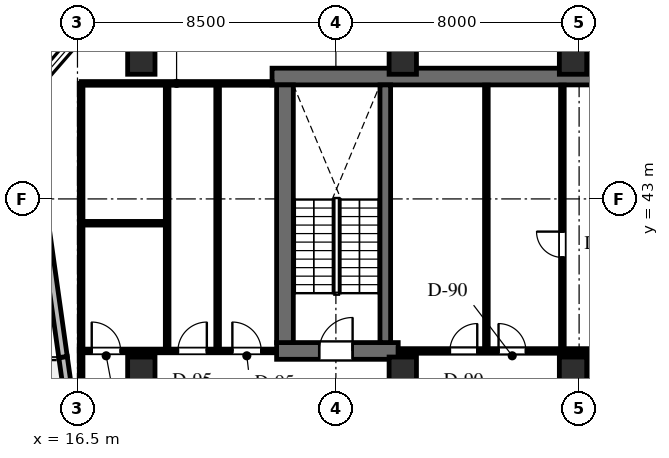
"""IFC4 building model, lengths in metres.
Left out: names, types, materials, properties, quantities, classifications, styles, units other than length and angle.
Written with IfcOpenShell. Run it as: python <this file> out.ifc"""

import sys

from ifc_helpers import new_model, si_unit, direction, frame, frame_2d, origin, origin_2d, place, context, subcontext, project, spatial, rectangle, extrude, element, fill, save


model = new_model("IFC4")
c1 = context("Model", 3, precision=1e-05, world=origin(), true_north=direction((0.0, 1.0)))
c2 = subcontext(c1, "Body", "Model", "MODEL_VIEW")
j1 = project(units=[si_unit("LENGTHUNIT", "METRE"), si_unit("PLANEANGLEUNIT", "RADIAN")], contexts=[c1])
p1 = place(None, origin())
s1 = spatial("IfcSite", under=j1, at=p1, CompositionType="ELEMENT")
p2 = place(p1, origin())
s2 = spatial("IfcBuilding", under=s1, at=p2, CompositionType="ELEMENT")
p3 = place(p2, frame((0.0, 0.0, 160.5)))
s3 = spatial("IfcBuildingStorey", under=s2, at=p3, CompositionType="ELEMENT", Elevation=160.5)
p4 = place(p3, frame((22.9, 47.025, 0.0), z_axis=(0.0, 0.0, 1.0), x_axis=(1.0, 0.0, 0.0)))
e1 = element("IfcWall", 1, at=p4, inside=s3, PredefinedType="SHEAR", context=c2, shape_type="SweptSolid", body=[
    extrude(rectangle(XDim=43.5, YDim=0.55, at=frame_2d((21.75, 0.0))), origin(), (0.0, 0.0, 1.0), 4.0),
])
p5 = place(p3, frame((23.05, 38.0, 0.0), z_axis=(0.0, 0.0, 1.0), x_axis=(1.0, 0.0, 0.0)))
e2 = element("IfcWall", 2, at=p5, inside=s3, PredefinedType="SHEAR", context=c2, shape_type="SweptSolid", body=[
    extrude(rectangle(XDim=4.0, YDim=0.55, at=frame_2d((2.0, 0.0))), origin(), (0.0, 0.0, 1.0), 4.0),
])
p6 = place(p5, frame((1.4, 0.0, 0.0)))
e3 = element("IfcOpeningElement", 3, at=p6, cuts=e2, PredefinedType="OPENING", context=c2, shape_type="SweptSolid", body=[
    extrude(rectangle(XDim=1.1, YDim=2.2, at=frame_2d((0.55, 1.1))), frame((0.0, 0.285, 0.0), z_axis=(0.0, -1.0, 0.0), x_axis=(1.0, 0.0, 0.0)), (0.0, 0.0, 1.0), 0.57),
])
p7 = place(p3, frame((23.325, 38.275, 0.0), z_axis=(0.0, 0.0, 1.0), x_axis=(0.0, 1.0, 0.0)))
e4 = element("IfcWall", 4, at=p7, inside=s3, PredefinedType="SHEAR", context=c2, shape_type="SweptSolid", body=[
    extrude(rectangle(XDim=8.475, YDim=0.55, at=frame_2d((4.238, 0.0))), origin(), (0.0, 0.0, 1.0), 4.0),
])
p8 = place(p3, frame((26.625, 38.275, 0.0), z_axis=(0.0, 0.0, 1.0), x_axis=(0.0, 1.0, 0.0)))
e5 = element("IfcWall", 5, at=p8, inside=s3, PredefinedType="SHEAR", context=c2, shape_type="SweptSolid", body=[
    extrude(rectangle(XDim=8.475, YDim=0.35, at=frame_2d((4.238, 0.0))), origin(), (0.0, 0.0, 1.0), 4.0),
])
for number, where, z_axis, x_axis in (
    (6, (32.8, 37.35, 0.0), (0.0, 0.0, 1.0), (1.0, 0.0, 0.0)),
    (7, (32.8, 47.55, 0.0), (0.0, 0.0, 1.0), (1.0, 0.0, 0.0)),
    (8, (27.2, 37.35, 0.0), (0.0, 0.0, 1.0), (1.0, 0.0, 0.0)),
    (9, (27.2, 47.55, 0.0), (0.0, 0.0, 1.0), (1.0, 0.0, 0.0)),
    (10, (18.6, 37.35, 0.0), (0.0, 0.0, 1.0), (1.0, 0.0, 0.0)),
    (11, (18.6, 47.55, 0.0), (0.0, 0.0, 1.0), (1.0, 0.0, 0.0)),
):
    element("IfcColumn", number, at=place(p3, frame(where, z_axis=z_axis, x_axis=x_axis)), inside=s3, PredefinedType="COLUMN", context=c2, shape_type="SweptSolid", body=[
        extrude(rectangle(XDim=0.9, YDim=0.9, at=origin_2d()), origin(), (0.0, 0.0, 1.0), 4.0),
    ])
p9 = place(p3, frame((19.434, 13.541, 0.0), z_axis=(0.0, 0.0, 1.0), x_axis=(-0.139173290738, 0.99026804207, 0.0)))
e12 = element("IfcWall", 12, at=p9, inside=s3, PredefinedType="STANDARD", context=c2, shape_type="SweptSolid", body=[
    extrude(rectangle(XDim=24.498, YDim=0.28, at=frame_2d((12.249, 0.0))), origin(), (0.0, 0.0, 1.0), 3.755),
])
p10 = place(p9, frame((11.578, 0.0, 0.0)))
e13 = element("IfcOpeningElement", 13, at=p10, cuts=e12, PredefinedType="OPENING", context=c2, shape_type="SweptSolid", body=[
    extrude(rectangle(XDim=1.1, YDim=2.2, at=frame_2d((0.55, 1.1))), frame((0.0, 0.15, 0.0), z_axis=(0.0, -1.0, 0.0), x_axis=(1.0, 0.0, 0.0)), (0.0, 0.0, 1.0), 0.3),
])
p11 = place(p9, frame((4.231, 0.0, 0.65)))
e14 = element("IfcOpeningElement", 14, at=p11, cuts=e12, PredefinedType="OPENING", context=c2, shape_type="SweptSolid", body=[
    extrude(rectangle(XDim=1.8, YDim=2.1, at=frame_2d((0.9, 1.05))), frame((0.0, 0.15, 0.0), z_axis=(0.0, -1.0, 0.0), x_axis=(1.0, 0.0, 0.0)), (0.0, 0.0, 1.0), 0.3),
])
p12 = place(p3, frame((16.025, 37.8, 0.0), z_axis=(0.0, 0.0, 1.0), x_axis=(-0.13918102754, 0.990266954701, 0.0)))
e15 = element("IfcWall", 15, at=p12, inside=s3, PredefinedType="STANDARD", context=c2, shape_type="SweptSolid", body=[
    extrude(rectangle(XDim=8.667, YDim=0.28, at=frame_2d((4.333, 0.0))), origin(), (0.0, 0.0, 1.0), 3.755),
])
p13 = place(p12, frame((3.374, 0.0, 0.65)))
e16 = element("IfcOpeningElement", 16, at=p13, cuts=e15, PredefinedType="OPENING", context=c2, shape_type="SweptSolid", body=[
    extrude(rectangle(XDim=1.8, YDim=2.1, at=frame_2d((0.9, 1.05))), frame((0.0, 0.15, 0.0), z_axis=(0.0, -1.0, 0.0), x_axis=(1.0, 0.0, 0.0)), (0.0, 0.0, 1.0), 0.3),
])
p14 = place(p3, frame((14.819, 46.383, 0.0), z_axis=(0.0, 0.0, 1.0), x_axis=(0.656071351282, 0.754698868442, 0.0)))
e17 = element("IfcWall", 17, at=p14, inside=s3, PredefinedType="STANDARD", context=c2, shape_type="SweptSolid", body=[
    extrude(rectangle(XDim=2.646, YDim=0.28, at=frame_2d((1.323, 0.0))), origin(), (0.0, 0.0, 1.0), 3.755),
])
p15 = place(p14, frame((0.416, 0.0, 0.65)))
e18 = element("IfcOpeningElement", 18, at=p15, cuts=e17, PredefinedType="OPENING", context=c2, shape_type="SweptSolid", body=[
    extrude(rectangle(XDim=1.8, YDim=2.1, at=frame_2d((0.9, 1.05))), frame((0.0, 0.15, 0.0), z_axis=(0.0, -1.0, 0.0), x_axis=(1.0, 0.0, 0.0)), (0.0, 0.0, 1.0), 0.3),
])
p16 = place(p3, frame((27.05, 38.0, 0.0), z_axis=(0.0, 0.0, 1.0), x_axis=(1.0, 0.0, 0.0)))
e19 = element("IfcWall", 19, at=p16, inside=s3, PredefinedType="PARTITIONING", context=c2, shape_type="SweptSolid", body=[
    extrude(rectangle(XDim=7.95, YDim=0.15, at=frame_2d((3.975, 0.0))), origin(), (0.0, 0.0, 1.0), 2.982),
])
p17 = place(p16, frame((1.7, 0.0, 0.0)))
e20 = element("IfcOpeningElement", 20, at=p17, cuts=e19, PredefinedType="OPENING", context=c2, shape_type="SweptSolid", body=[
    extrude(rectangle(XDim=0.9, YDim=2.1, at=frame_2d((0.45, 1.05))), frame((0.0, 0.085, 0.0), z_axis=(0.0, -1.0, 0.0), x_axis=(1.0, 0.0, 0.0)), (0.0, 0.0, 1.0), 0.17),
])
p18 = place(p16, frame((3.3, 0.0, 0.0)))
e21 = element("IfcOpeningElement", 21, at=p18, cuts=e19, PredefinedType="OPENING", context=c2, shape_type="SweptSolid", body=[
    extrude(rectangle(XDim=0.9, YDim=2.1, at=frame_2d((0.45, 1.05))), frame((0.0, 0.085, 0.0), z_axis=(0.0, -1.0, 0.0), x_axis=(1.0, 0.0, 0.0)), (0.0, 0.0, 1.0), 0.17),
])
p19 = place(p3, frame((29.95, 38.068, 0.0), z_axis=(0.0, 0.0, 1.0), x_axis=(0.0, 1.0, 0.0)))
e22 = element("IfcWall", 22, at=p19, inside=s3, PredefinedType="PARTITIONING", context=c2, shape_type="SweptSolid", body=[
    extrude(rectangle(XDim=8.674, YDim=0.12, at=frame_2d((4.337, 0.0))), origin(), (0.0, 0.0, 1.0), 3.755),
])
p20 = place(p3, frame((32.45, 38.068, 0.0), z_axis=(0.0, 0.0, 1.0), x_axis=(0.0, 1.0, 0.0)))
e23 = element("IfcWall", 23, at=p20, inside=s3, PredefinedType="PARTITIONING", context=c2, shape_type="SweptSolid", body=[
    extrude(rectangle(XDim=8.674, YDim=0.12, at=frame_2d((4.337, 0.0))), origin(), (0.0, 0.0, 1.0), 3.755),
])
p21 = place(p20, frame((3.007, 0.0, 0.0)))
e24 = element("IfcOpeningElement", 24, at=p21, cuts=e23, PredefinedType="OPENING", context=c2, shape_type="SweptSolid", body=[
    extrude(rectangle(XDim=0.85, YDim=2.1, at=frame_2d((0.425, 1.05))), frame((0.0, 0.07, 0.0), z_axis=(0.0, -1.0, 0.0), x_axis=(1.0, 0.0, 0.0)), (0.0, 0.0, 1.0), 0.14),
])
p22 = place(p3, frame((16.62, 38.0, 0.0), z_axis=(0.0, 0.0, 1.0), x_axis=(1.0, 0.0, 0.0)))
e25 = element("IfcWall", 25, at=p22, inside=s3, PredefinedType="PARTITIONING", context=c2, shape_type="SweptSolid", body=[
    extrude(rectangle(XDim=6.43, YDim=0.12, at=frame_2d((3.215, 0.0))), origin(), (0.0, 0.0, 1.0), 2.982),
])
p23 = place(p22, frame((0.349, 0.0, 0.0)))
e26 = element("IfcOpeningElement", 26, at=p23, cuts=e25, PredefinedType="OPENING", context=c2, shape_type="SweptSolid", body=[
    extrude(rectangle(XDim=0.95, YDim=2.15, at=frame_2d((0.475, 1.075))), frame((0.0, 0.07, 0.0), z_axis=(0.0, -1.0, 0.0), x_axis=(1.0, 0.0, 0.0)), (0.0, 0.0, 1.0), 0.14),
])
p24 = place(p22, frame((3.185, 0.0, 0.0)))
e27 = element("IfcOpeningElement", 27, at=p24, cuts=e25, PredefinedType="OPENING", context=c2, shape_type="SweptSolid", body=[
    extrude(rectangle(XDim=0.95, YDim=2.15, at=frame_2d((0.475, 1.075))), frame((0.0, 0.07, 0.0), z_axis=(0.0, -1.0, 0.0), x_axis=(1.0, 0.0, 0.0)), (0.0, 0.0, 1.0), 0.14),
])
p25 = place(p22, frame((4.975, 0.0, 0.0)))
e28 = element("IfcOpeningElement", 28, at=p25, cuts=e25, PredefinedType="OPENING", context=c2, shape_type="SweptSolid", body=[
    extrude(rectangle(XDim=0.95, YDim=2.15, at=frame_2d((0.475, 1.075))), frame((0.0, 0.07, 0.0), z_axis=(0.0, -1.0, 0.0), x_axis=(1.0, 0.0, 0.0)), (0.0, 0.0, 1.0), 0.14),
])
p26 = place(p3, frame((16.62, 38.0, 0.0), z_axis=(0.0, 0.0, 1.0), x_axis=(0.0, 1.0, 0.0)))
e29 = element("IfcWall", 29, at=p26, inside=s3, PredefinedType="PARTITIONING", context=c2, shape_type="SweptSolid", body=[
    extrude(rectangle(XDim=8.8, YDim=0.12, at=frame_2d((4.4, 0.0))), origin(), (0.0, 0.0, 1.0), 3.755),
])
p27 = place(p3, frame((16.62, 46.8, 0.0), z_axis=(0.0, 0.0, 1.0), x_axis=(1.0, 0.0, 0.0)))
e30 = element("IfcWall", 30, at=p27, inside=s3, PredefinedType="PARTITIONING", context=c2, shape_type="SweptSolid", body=[
    extrude(rectangle(XDim=6.28, YDim=0.12, at=frame_2d((3.14, 0.0))), origin(), (0.0, 0.0, 1.0), 2.982),
])
for number, where, z_axis, x_axis in (
    (31, (19.45, 38.068, 0.0), (0.0, 0.0, 1.0), (0.0, 1.0, 0.0)),
    (32, (21.11, 38.068, 0.0), (0.0, 0.0, 1.0), (0.0, 1.0, 0.0)),
):
    element("IfcWall", number, at=place(p3, frame(where, z_axis=z_axis, x_axis=x_axis)), inside=s3, PredefinedType="PARTITIONING", context=c2, shape_type="SweptSolid", body=[
        extrude(rectangle(XDim=8.664, YDim=0.12, at=frame_2d((4.332, 0.0))), origin(), (0.0, 0.0, 1.0), 3.755),
    ])
p28 = place(p3, frame((16.688, 42.2, 0.0), z_axis=(0.0, 0.0, 1.0), x_axis=(1.0, 0.0, 0.0)))
e33 = element("IfcWall", 33, at=p28, inside=s3, PredefinedType="PARTITIONING", context=c2, shape_type="SweptSolid", body=[
    extrude(rectangle(XDim=2.694, YDim=0.12, at=frame_2d((1.347, 0.0))), origin(), (0.0, 0.0, 1.0), 2.982),
])
p29 = place(p3, frame((16.62, 34.752, 0.0), z_axis=(0.0, 0.0, 1.0), x_axis=(0.0, 1.0, 0.0)))
e34 = element("IfcWall", 34, at=p29, inside=s3, PredefinedType="PARTITIONING", context=c2, shape_type="SweptSolid", body=[
    extrude(rectangle(XDim=3.298, YDim=0.12, at=frame_2d((1.649, 0.0))), origin(), (0.0, 0.0, 1.0), 3.755),
])
p30 = place(p15, origin())
e35 = element("IfcWindow", 35, at=p30, inside=s3, PartitioningType="SINGLE_PANEL", PredefinedType="WINDOW", context=c2, shape_type="SweptSolid", body=[
    extrude(rectangle(XDim=1.8, YDim=2.1, at=frame_2d((0.9, 1.05))), frame((0.0, 0.03, 0.0), z_axis=(0.0, -1.0, 0.0), x_axis=(1.0, 0.0, 0.0)), (0.0, 0.0, 1.0), 0.06),
])
fill(e18, e35)
p31 = place(p6, origin())
e36 = element("IfcDoor", 36, at=p31, inside=s3, OperationType="SINGLE_SWING_RIGHT", PredefinedType="DOOR", context=c2, shape_type="SweptSolid", body=[
    extrude(rectangle(XDim=1.1, YDim=2.2, at=frame_2d((0.55, 1.1))), frame((0.0, 0.025, 0.0), z_axis=(0.0, -1.0, 0.0), x_axis=(1.0, 0.0, 0.0)), (0.0, 0.0, 1.0), 0.05),
])
fill(e3, e36)
p32 = place(p17, origin())
e37 = element("IfcDoor", 37, at=p32, inside=s3, OperationType="SINGLE_SWING_RIGHT", PredefinedType="DOOR", context=c2, shape_type="SweptSolid", body=[
    extrude(rectangle(XDim=0.9, YDim=2.1, at=frame_2d((0.45, 1.05))), frame((0.0, 0.025, 0.0), z_axis=(0.0, -1.0, 0.0), x_axis=(1.0, 0.0, 0.0)), (0.0, 0.0, 1.0), 0.05),
])
fill(e20, e37)
p33 = place(p18, origin())
e38 = element("IfcDoor", 38, at=p33, inside=s3, OperationType="SINGLE_SWING_LEFT", PredefinedType="DOOR", context=c2, shape_type="SweptSolid", body=[
    extrude(rectangle(XDim=0.9, YDim=2.1, at=frame_2d((0.45, 1.05))), frame((0.0, 0.025, 0.0), z_axis=(0.0, -1.0, 0.0), x_axis=(1.0, 0.0, 0.0)), (0.0, 0.0, 1.0), 0.05),
])
fill(e21, e38)
p34 = place(p21, origin())
e39 = element("IfcDoor", 39, at=p34, inside=s3, OperationType="SINGLE_SWING_RIGHT", PredefinedType="DOOR", context=c2, shape_type="SweptSolid", body=[
    extrude(rectangle(XDim=0.85, YDim=2.1, at=frame_2d((0.425, 1.05))), frame((0.0, 0.025, 0.0), z_axis=(0.0, -1.0, 0.0), x_axis=(1.0, 0.0, 0.0)), (0.0, 0.0, 1.0), 0.05),
])
fill(e24, e39)
p35 = place(p23, origin())
e40 = element("IfcDoor", 40, at=p35, inside=s3, OperationType="SINGLE_SWING_LEFT", PredefinedType="DOOR", context=c2, shape_type="SweptSolid", body=[
    extrude(rectangle(XDim=0.95, YDim=2.15, at=frame_2d((0.475, 1.075))), frame((0.0, 0.025, 0.0), z_axis=(0.0, -1.0, 0.0), x_axis=(1.0, 0.0, 0.0)), (0.0, 0.0, 1.0), 0.05),
])
fill(e26, e40)
p36 = place(p24, origin())
e41 = element("IfcDoor", 41, at=p36, inside=s3, OperationType="SINGLE_SWING_RIGHT", PredefinedType="DOOR", context=c2, shape_type="SweptSolid", body=[
    extrude(rectangle(XDim=0.95, YDim=2.15, at=frame_2d((0.475, 1.075))), frame((0.0, 0.025, 0.0), z_axis=(0.0, -1.0, 0.0), x_axis=(1.0, 0.0, 0.0)), (0.0, 0.0, 1.0), 0.05),
])
fill(e27, e41)
p37 = place(p25, origin())
e42 = element("IfcDoor", 42, at=p37, inside=s3, OperationType="SINGLE_SWING_LEFT", PredefinedType="DOOR", context=c2, shape_type="SweptSolid", body=[
    extrude(rectangle(XDim=0.95, YDim=2.15, at=frame_2d((0.475, 1.075))), frame((0.0, 0.025, 0.0), z_axis=(0.0, -1.0, 0.0), x_axis=(1.0, 0.0, 0.0)), (0.0, 0.0, 1.0), 0.05),
])
fill(e28, e42)
save(model, sys.argv[1])
